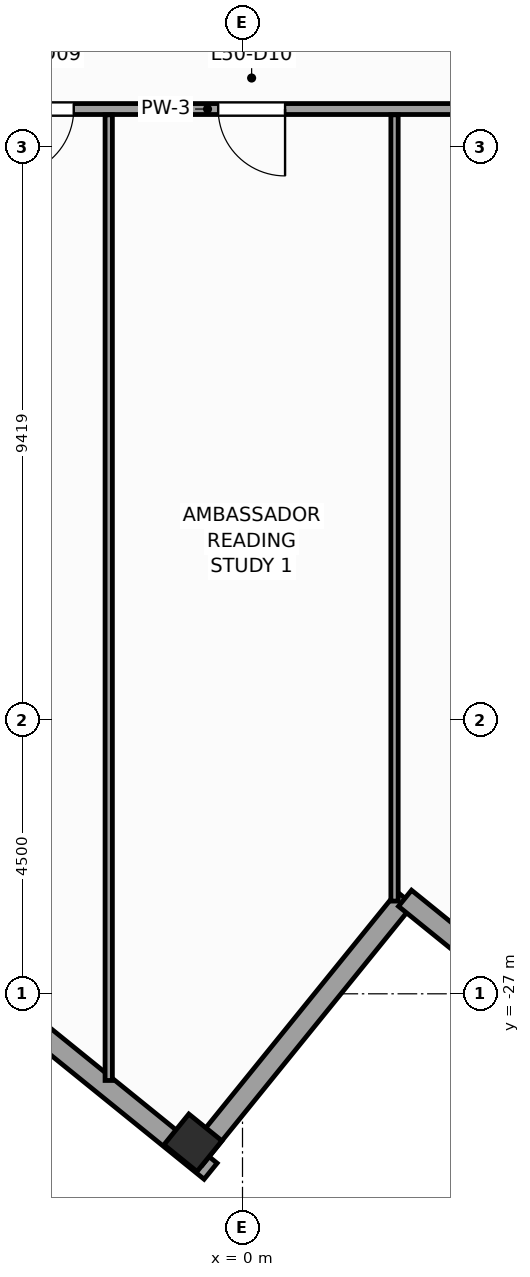
"""IFC4 building model, lengths in metres.
Left out: names, types, materials, properties, quantities, classifications, styles, units other than length and angle.
Written with IfcOpenShell. Run it as: python <this file> out.ifc"""

import sys

from ifc_helpers import new_model, si_unit, direction, frame, frame_2d, origin, origin_2d, place, context, subcontext, project, spatial, rectangle, extrude, source, transform, mapped, element, fill, save


model = new_model("IFC4")
c1 = context("Model", 3, precision=1e-05, world=origin(), true_north=direction((0.0, 1.0)))
c2 = subcontext(c1, "Body", "Model", "MODEL_VIEW")
j1 = project(units=[si_unit("LENGTHUNIT", "METRE"), si_unit("PLANEANGLEUNIT", "RADIAN")], contexts=[c1])
p1 = place(None, origin())
s1 = spatial("IfcSite", under=j1, at=p1, CompositionType="ELEMENT")
p2 = place(p1, origin())
s2 = spatial("IfcBuilding", under=s1, at=p2, CompositionType="ELEMENT")
p3 = place(p2, frame((0.0, 0.0, 209.5)))
s3 = spatial("IfcBuildingStorey", under=s2, at=p3, CompositionType="ELEMENT", Elevation=209.5)
m1 = source(origin(), c2, "Body", "SweptSolid", [
    extrude(rectangle(XDim=0.65, YDim=0.7, at=origin_2d()), origin(), (0.0, 0.0, 1.0), 3.9),
])
p4 = place(p3, frame((-0.815, -29.45, 0.0), z_axis=(0.0, 0.0, 1.0), x_axis=(0.62932039105, 0.777145961457, 0.0)))
e1 = element("IfcColumn", 1, at=p4, inside=s3, PredefinedType="COLUMN", context=c2, shape_type="MappedRepresentation", body=[
    mapped(m1, transform((0.0, 0.0, 0.0), scale=1.0)),
])
p5 = place(p3, frame((-29.154, -6.733, 0.0), z_axis=(0.0, 0.0, 1.0), x_axis=(0.77714192302, -0.629325378072, 0.0)))
e2 = element("IfcWall", 2, at=p5, inside=s3, PredefinedType="STANDARD", context=c2, shape_type="SweptSolid", body=[
    extrude(rectangle(XDim=36.84, YDim=0.34, at=frame_2d((18.42, 0.0))), origin(), (0.0, 0.0, 1.0), 2.96),
])
p6 = place(p5, frame((3.721, 0.0, 0.48)))
e3 = element("IfcOpeningElement", 3, at=p6, cuts=e2, PredefinedType="OPENING", context=c2, shape_type="SweptSolid", body=[
    extrude(rectangle(XDim=1.4, YDim=2.4, at=frame_2d((0.7, 1.2))), frame((0.0, 0.18, 0.0), z_axis=(0.0, -1.0, 0.0), x_axis=(1.0, 0.0, 0.0)), (0.0, 0.0, 1.0), 0.36),
])
p7 = place(p5, frame((9.809, 0.0, 0.58)))
e4 = element("IfcOpeningElement", 4, at=p7, cuts=e2, PredefinedType="OPENING", context=c2, shape_type="SweptSolid", body=[
    extrude(rectangle(XDim=1.75, YDim=2.3, at=frame_2d((0.875, 1.15))), frame((0.0, 0.18, 0.0), z_axis=(0.0, -1.0, 0.0), x_axis=(1.0, 0.0, 0.0)), (0.0, 0.0, 1.0), 0.36),
])
p8 = place(p5, frame((16.058, 0.0, 0.58)))
e5 = element("IfcOpeningElement", 5, at=p8, cuts=e2, PredefinedType="OPENING", context=c2, shape_type="SweptSolid", body=[
    extrude(rectangle(XDim=1.75, YDim=2.3, at=frame_2d((0.875, 1.15))), frame((0.0, 0.18, 0.0), z_axis=(0.0, -1.0, 0.0), x_axis=(1.0, 0.0, 0.0)), (0.0, 0.0, 1.0), 0.36),
])
p9 = place(p5, frame((24.176, 0.0, 0.58)))
e6 = element("IfcOpeningElement", 6, at=p9, cuts=e2, PredefinedType="OPENING", context=c2, shape_type="SweptSolid", body=[
    extrude(rectangle(XDim=1.75, YDim=2.3, at=frame_2d((0.875, 1.15))), frame((0.0, 0.18, 0.0), z_axis=(0.0, -1.0, 0.0), x_axis=(1.0, 0.0, 0.0)), (0.0, 0.0, 1.0), 0.36),
])
p10 = place(p5, frame((30.982, 0.0, 0.48)))
e7 = element("IfcOpeningElement", 7, at=p10, cuts=e2, PredefinedType="OPENING", context=c2, shape_type="SweptSolid", body=[
    extrude(rectangle(XDim=1.4, YDim=2.4, at=frame_2d((0.7, 1.2))), frame((0.0, 0.18, 0.0), z_axis=(0.0, -1.0, 0.0), x_axis=(1.0, 0.0, 0.0)), (0.0, 0.0, 1.0), 0.36),
])
p11 = place(p3, frame((-0.789, -29.703, 0.0), z_axis=(0.0, 0.0, 1.0), x_axis=(0.629323365087, 0.77714355312, 0.0)))
e8 = element("IfcWall", 8, at=p11, inside=s3, PredefinedType="STANDARD", context=c2, shape_type="SweptSolid", body=[
    extrude(rectangle(XDim=5.5, YDim=0.34, at=frame_2d((2.75, 0.0))), origin(), (0.0, 0.0, 1.0), 3.66),
])
p12 = place(p3, frame((2.673, -25.429, 0.0), z_axis=(0.0, 0.0, 1.0), x_axis=(0.777162640055, -0.629299794138, 0.0)))
e9 = element("IfcWall", 9, at=p12, inside=s3, PredefinedType="STANDARD", context=c2, shape_type="SweptSolid", body=[
    extrude(rectangle(XDim=5.67, YDim=0.34, at=frame_2d((2.835, 0.0))), origin(), (0.0, 0.0, 1.0), 3.66),
])
p13 = place(p12, frame((2.135, 0.0, 0.48)))
e10 = element("IfcOpeningElement", 10, at=p13, cuts=e9, PredefinedType="OPENING", context=c2, shape_type="SweptSolid", body=[
    extrude(rectangle(XDim=1.4, YDim=2.4, at=frame_2d((0.7, 1.2))), frame((0.0, 0.18, 0.0), z_axis=(0.0, -1.0, 0.0), x_axis=(1.0, 0.0, 0.0)), (0.0, 0.0, 1.0), 0.36),
])
p14 = place(p3, frame((-11.45, -12.45, 0.0), z_axis=(0.0, 0.0, 1.0), x_axis=(1.0, 0.0, 0.0)))
e11 = element("IfcWall", 11, at=p14, inside=s3, PredefinedType="PARTITIONING", context=c2, shape_type="SweptSolid", body=[
    extrude(rectangle(XDim=21.75, YDim=0.18, at=frame_2d((10.875, 0.0))), origin(), (0.0, 0.0, 1.0), 3.66),
])
p15 = place(p14, frame((5.411, 0.0, 0.0)))
e12 = element("IfcOpeningElement", 12, at=p15, cuts=e11, PredefinedType="OPENING", context=c2, shape_type="SweptSolid", body=[
    extrude(rectangle(XDim=0.95, YDim=2.1, at=frame_2d((0.475, 1.05))), frame((0.0, 0.1, 0.0), z_axis=(0.0, -1.0, 0.0), x_axis=(1.0, 0.0, 0.0)), (0.0, 0.0, 1.0), 0.2),
])
p16 = place(p14, frame((1.839, 0.0, 0.0)))
e13 = element("IfcOpeningElement", 13, at=p16, cuts=e11, PredefinedType="OPENING", context=c2, shape_type="SweptSolid", body=[
    extrude(rectangle(XDim=1.1, YDim=2.2, at=frame_2d((0.55, 1.1))), frame((0.0, 0.1, 0.0), z_axis=(0.0, -1.0, 0.0), x_axis=(1.0, 0.0, 0.0)), (0.0, 0.0, 1.0), 0.2),
])
p17 = place(p14, frame((7.574, 0.0, 0.0)))
e14 = element("IfcOpeningElement", 14, at=p17, cuts=e11, PredefinedType="OPENING", context=c2, shape_type="SweptSolid", body=[
    extrude(rectangle(XDim=1.1, YDim=2.2, at=frame_2d((0.55, 1.1))), frame((0.0, 0.1, 0.0), z_axis=(0.0, -1.0, 0.0), x_axis=(1.0, 0.0, 0.0)), (0.0, 0.0, 1.0), 0.2),
])
p18 = place(p14, frame((11.05, 0.0, 0.0)))
e15 = element("IfcOpeningElement", 15, at=p18, cuts=e11, PredefinedType="OPENING", context=c2, shape_type="SweptSolid", body=[
    extrude(rectangle(XDim=1.1, YDim=2.2, at=frame_2d((0.55, 1.1))), frame((0.0, 0.1, 0.0), z_axis=(0.0, -1.0, 0.0), x_axis=(1.0, 0.0, 0.0)), (0.0, 0.0, 1.0), 0.2),
])
p19 = place(p14, frame((15.65, 0.0, 0.0)))
e16 = element("IfcOpeningElement", 16, at=p19, cuts=e11, PredefinedType="OPENING", context=c2, shape_type="SweptSolid", body=[
    extrude(rectangle(XDim=1.1, YDim=2.2, at=frame_2d((0.55, 1.1))), frame((0.0, 0.1, 0.0), z_axis=(0.0, -1.0, 0.0), x_axis=(1.0, 0.0, 0.0)), (0.0, 0.0, 1.0), 0.2),
])
p20 = place(p3, frame((-2.2, -28.425, 0.0), z_axis=(0.0, 0.0, 1.0), x_axis=(0.0, 1.0, 0.0)))
e17 = element("IfcWall", 17, at=p20, inside=s3, PredefinedType="PARTITIONING", context=c2, shape_type="SweptSolid", body=[
    extrude(rectangle(XDim=15.88, YDim=0.12, at=frame_2d((7.94, 0.0))), origin(), (0.0, 0.0, 1.0), 3.66),
])
p21 = place(p3, frame((2.5, -25.475, 0.0), z_axis=(0.0, 0.0, 1.0), x_axis=(0.0, 1.0, 0.0)))
e18 = element("IfcWall", 18, at=p21, inside=s3, PredefinedType="PARTITIONING", context=c2, shape_type="SweptSolid", body=[
    extrude(rectangle(XDim=12.93, YDim=0.12, at=frame_2d((6.465, 0.0))), origin(), (0.0, 0.0, 1.0), 3.66),
])
m2 = source(origin(), c2, "Body", "SweptSolid", [
    extrude(rectangle(XDim=1.1, YDim=2.2, at=frame_2d((0.55, 1.1))), frame((0.0, 0.025, 0.0), z_axis=(0.0, -1.0, 0.0), x_axis=(1.0, 0.0, 0.0)), (0.0, 0.0, 1.0), 0.05),
])
p22 = place(p17, frame((1.1, 0.0, 0.0), z_axis=(0.0, 0.0, 1.0), x_axis=(-1.0, 0.0, 0.0)))
e19 = element("IfcDoor", 19, at=p22, inside=s3, OperationType="SINGLE_SWING_LEFT", PredefinedType="DOOR", context=c2, shape_type="MappedRepresentation", body=[
    mapped(m2, transform((0.0, 0.0, 0.0), scale=1.0)),
])
fill(e14, e19)
p23 = place(p18, frame((1.1, 0.0, 0.0), z_axis=(0.0, 0.0, 1.0), x_axis=(-1.0, 0.0, 0.0)))
e20 = element("IfcDoor", 20, at=p23, inside=s3, OperationType="SINGLE_SWING_RIGHT", PredefinedType="DOOR", context=c2, shape_type="MappedRepresentation", body=[
    mapped(m2, transform((0.0, 0.0, 0.0), scale=1.0)),
])
fill(e15, e20)
save(model, sys.argv[1])
